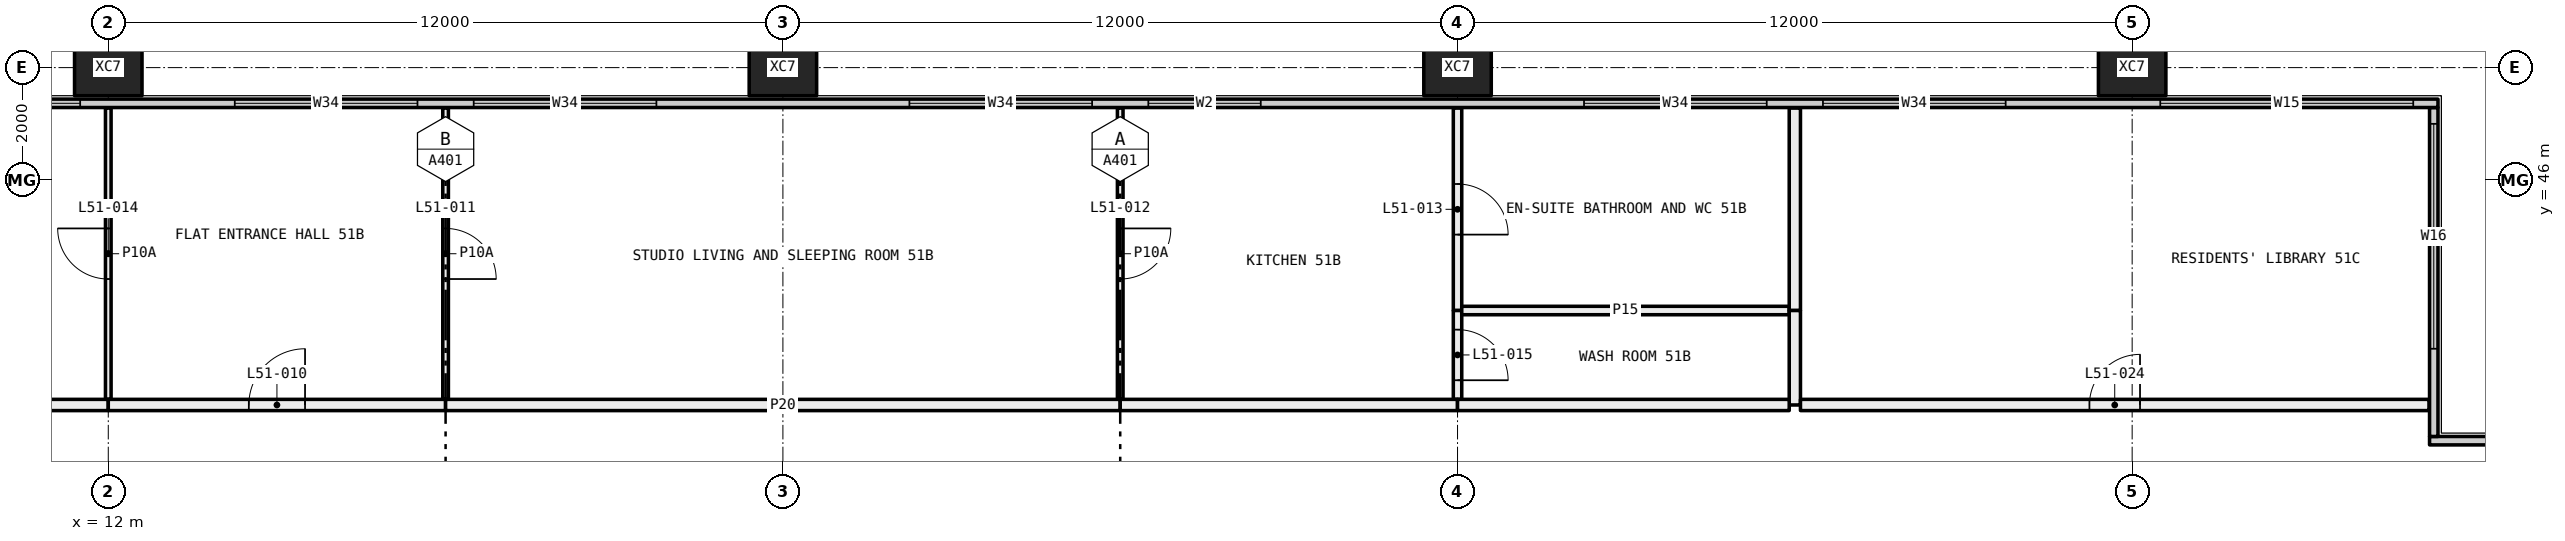
"""IFC4 building model, lengths in metres.
Left out: names, types, materials, properties, quantities, classifications, styles, units other than length and angle.
Written with IfcOpenShell. Run it as: python <this file> out.ifc"""

import sys

from ifc_helpers import new_model, si_unit, direction, frame, frame_2d, origin, origin_2d, place, context, subcontext, project, spatial, rectangle, hollow_rectangle, extrude, element, fill, save


model = new_model("IFC4")
c1 = context("Model", 3, precision=1e-05, world=origin(), true_north=direction((0.0, 1.0)))
c2 = subcontext(c1, "Body", "Model", "MODEL_VIEW")
j1 = project(units=[si_unit("LENGTHUNIT", "METRE"), si_unit("PLANEANGLEUNIT", "RADIAN")], contexts=[c1])
p1 = place(None, origin())
s1 = spatial("IfcSite", under=j1, at=p1, CompositionType="ELEMENT")
p2 = place(p1, origin())
s2 = spatial("IfcBuilding", under=s1, at=p2, CompositionType="ELEMENT")
p3 = place(p2, frame((0.0, 0.0, 192.75)))
s3 = spatial("IfcBuildingStorey", under=s2, at=p3, CompositionType="ELEMENT", Elevation=192.75)
for number, where, z_axis, x_axis in (
    (1, (12.0, 48.0, -0.4), (0.0, 0.0, 1.0), (1.0, 0.0, 0.0)),
    (2, (24.0, 48.0, -0.4), (0.0, 0.0, 1.0), (1.0, 0.0, 0.0)),
    (3, (36.0, 48.0, -0.4), (0.0, 0.0, 1.0), (1.0, 0.0, 0.0)),
    (4, (48.0, 48.0, -0.4), (0.0, 0.0, 1.0), (1.0, 0.0, 0.0)),
):
    element("IfcColumn", number, at=place(p3, frame(where, z_axis=z_axis, x_axis=x_axis)), inside=s3, PredefinedType="COLUMN", context=c2, shape_type="SweptSolid", body=[
        extrude(hollow_rectangle(XDim=1.2, YDim=1.0, WallThickness=0.045, at=origin_2d()), origin(), (0.0, 0.0, 1.0), 3.45),
    ])
p4 = place(p3, frame((53.29, 41.365, 0.0), z_axis=(0.0, 0.0, 1.0), x_axis=(1.0, 0.0, 0.0)))
e5 = element("IfcWall", 5, at=p4, inside=s3, PredefinedType="ELEMENTEDWALL", context=c2, shape_type="SweptSolid", body=[
    extrude(rectangle(XDim=6.15, YDim=0.15, at=frame_2d((3.075, 0.0))), origin(), (0.0, 0.0, 1.0), 3.05),
])
p5 = place(p4, frame((1.71, 0.0, 0.45)))
e6 = element("IfcOpeningElement", 6, at=p5, cuts=e5, PredefinedType="OPENING", context=c2, shape_type="SweptSolid", body=[
    extrude(rectangle(XDim=4.0, YDim=2.55, at=frame_2d((2.0, 1.275))), frame((0.0, 0.085, 0.0), z_axis=(0.0, -1.0, 0.0), x_axis=(1.0, 0.0, 0.0)), (0.0, 0.0, 1.0), 0.17),
])
p6 = place(p3, frame((53.365, 41.44, 0.0), z_axis=(0.0, 0.0, 1.0), x_axis=(0.0, 1.0, 0.0)))
e7 = element("IfcWall", 7, at=p6, inside=s3, PredefinedType="ELEMENTEDWALL", context=c2, shape_type="SweptSolid", body=[
    extrude(rectangle(XDim=5.85, YDim=0.15, at=frame_2d((2.925, 0.0))), origin(), (0.0, 0.0, 1.0), 3.05),
])
p7 = place(p6, frame((1.56, 0.0, 0.45)))
e8 = element("IfcOpeningElement", 8, at=p7, cuts=e7, PredefinedType="OPENING", context=c2, shape_type="SweptSolid", body=[
    extrude(rectangle(XDim=4.0, YDim=2.55, at=frame_2d((2.0, 1.275))), frame((0.0, 0.085, 0.0), z_axis=(0.0, -1.0, 0.0), x_axis=(1.0, 0.0, 0.0)), (0.0, 0.0, 1.0), 0.17),
])
p8 = place(p3, frame((6.56, 47.365, 0.0), z_axis=(0.0, 0.0, 1.0), x_axis=(1.0, 0.0, 0.0)))
e9 = element("IfcWall", 9, at=p8, inside=s3, PredefinedType="ELEMENTEDWALL", context=c2, shape_type="SweptSolid", body=[
    extrude(rectangle(XDim=46.88, YDim=0.15, at=frame_2d((23.44, 0.0))), origin(), (0.0, 0.0, 1.0), 3.05),
])
p9 = place(p8, frame((0.44, 0.0, 0.45)))
e10 = element("IfcOpeningElement", 10, at=p9, cuts=e9, PredefinedType="OPENING", context=c2, shape_type="SweptSolid", body=[
    extrude(rectangle(XDim=4.5, YDim=2.55, at=frame_2d((2.25, 1.275))), frame((0.0, 0.085, 0.0), z_axis=(0.0, -1.0, 0.0), x_axis=(1.0, 0.0, 0.0)), (0.0, 0.0, 1.0), 0.17),
])
p10 = place(p8, frame((7.69, 0.0, 0.45)))
e11 = element("IfcOpeningElement", 11, at=p10, cuts=e9, PredefinedType="OPENING", context=c2, shape_type="SweptSolid", body=[
    extrude(rectangle(XDim=3.25, YDim=2.55, at=frame_2d((1.625, 1.275))), frame((0.0, 0.085, 0.0), z_axis=(0.0, -1.0, 0.0), x_axis=(1.0, 0.0, 0.0)), (0.0, 0.0, 1.0), 0.17),
])
p11 = place(p8, frame((11.94, 0.0, 0.45)))
e12 = element("IfcOpeningElement", 12, at=p11, cuts=e9, PredefinedType="OPENING", context=c2, shape_type="SweptSolid", body=[
    extrude(rectangle(XDim=3.25, YDim=2.55, at=frame_2d((1.625, 1.275))), frame((0.0, 0.085, 0.0), z_axis=(0.0, -1.0, 0.0), x_axis=(1.0, 0.0, 0.0)), (0.0, 0.0, 1.0), 0.17),
])
p12 = place(p8, frame((19.69, 0.0, 0.45)))
e13 = element("IfcOpeningElement", 13, at=p12, cuts=e9, PredefinedType="OPENING", context=c2, shape_type="SweptSolid", body=[
    extrude(rectangle(XDim=3.25, YDim=2.55, at=frame_2d((1.625, 1.275))), frame((0.0, 0.085, 0.0), z_axis=(0.0, -1.0, 0.0), x_axis=(1.0, 0.0, 0.0)), (0.0, 0.0, 1.0), 0.17),
])
p13 = place(p8, frame((23.94, 0.0, 0.45)))
e14 = element("IfcOpeningElement", 14, at=p13, cuts=e9, PredefinedType="OPENING", context=c2, shape_type="SweptSolid", body=[
    extrude(rectangle(XDim=2.0, YDim=2.55, at=frame_2d((1.0, 1.275))), frame((0.0, 0.085, 0.0), z_axis=(0.0, -1.0, 0.0), x_axis=(1.0, 0.0, 0.0)), (0.0, 0.0, 1.0), 0.17),
])
p14 = place(p8, frame((31.69, 0.0, 0.45)))
e15 = element("IfcOpeningElement", 15, at=p14, cuts=e9, PredefinedType="OPENING", context=c2, shape_type="SweptSolid", body=[
    extrude(rectangle(XDim=3.25, YDim=2.55, at=frame_2d((1.625, 1.275))), frame((0.0, 0.085, 0.0), z_axis=(0.0, -1.0, 0.0), x_axis=(1.0, 0.0, 0.0)), (0.0, 0.0, 1.0), 0.17),
])
p15 = place(p8, frame((35.94, 0.0, 0.45)))
e16 = element("IfcOpeningElement", 16, at=p15, cuts=e9, PredefinedType="OPENING", context=c2, shape_type="SweptSolid", body=[
    extrude(rectangle(XDim=3.25, YDim=2.55, at=frame_2d((1.625, 1.275))), frame((0.0, 0.085, 0.0), z_axis=(0.0, -1.0, 0.0), x_axis=(1.0, 0.0, 0.0)), (0.0, 0.0, 1.0), 0.17),
])
p16 = place(p8, frame((41.94, 0.0, 0.45)))
e17 = element("IfcOpeningElement", 17, at=p16, cuts=e9, PredefinedType="OPENING", context=c2, shape_type="SweptSolid", body=[
    extrude(rectangle(XDim=4.5, YDim=2.55, at=frame_2d((2.25, 1.275))), frame((0.0, 0.085, 0.0), z_axis=(0.0, -1.0, 0.0), x_axis=(1.0, 0.0, 0.0)), (0.0, 0.0, 1.0), 0.17),
])
p17 = place(p3, frame((12.0, 42.1, 0.0), z_axis=(0.0, 0.0, 1.0), x_axis=(0.0, 1.0, 0.0)))
e18 = element("IfcWall", 18, at=p17, inside=s3, PredefinedType="PARTITIONING", context=c2, shape_type="SweptSolid", body=[
    extrude(rectangle(XDim=5.18, YDim=0.1, at=frame_2d((2.59, 0.0))), origin(), (0.0, 0.0, 1.0), 3.05),
])
p18 = place(p17, frame((2.14, 0.0, 0.0)))
e19 = element("IfcOpeningElement", 19, at=p18, cuts=e18, PredefinedType="OPENING", context=c2, shape_type="SweptSolid", body=[
    extrude(rectangle(XDim=0.9, YDim=2.1, at=frame_2d((0.45, 1.05))), frame((0.0, 0.06, 0.0), z_axis=(0.0, -1.0, 0.0), x_axis=(1.0, 0.0, 0.0)), (0.0, 0.0, 1.0), 0.12),
])
p19 = place(p3, frame((10.1, 42.0, 0.0), z_axis=(0.0, 0.0, 1.0), x_axis=(1.0, 0.0, 0.0)))
e20 = element("IfcWall", 20, at=p19, inside=s3, PredefinedType="PARTITIONING", context=c2, shape_type="SweptSolid", body=[
    extrude(rectangle(XDim=1.9, YDim=0.2, at=frame_2d((0.95, 0.0))), origin(), (0.0, 0.0, 1.0), 3.05),
])
p20 = place(p3, frame((18.0, 42.1, 0.0), z_axis=(0.0, 0.0, 1.0), x_axis=(0.0, 1.0, 0.0)))
e21 = element("IfcWall", 21, at=p20, inside=s3, PredefinedType="PARTITIONING", context=c2, shape_type="SweptSolid", body=[
    extrude(rectangle(XDim=5.18, YDim=0.1, at=frame_2d((2.59, 0.0))), origin(), (0.0, 0.0, 1.0), 3.05),
])
p21 = place(p20, frame((2.14, 0.0, 0.0)))
e22 = element("IfcOpeningElement", 22, at=p21, cuts=e21, PredefinedType="OPENING", context=c2, shape_type="SweptSolid", body=[
    extrude(rectangle(XDim=0.9, YDim=2.1, at=frame_2d((0.45, 1.05))), frame((0.0, 0.06, 0.0), z_axis=(0.0, -1.0, 0.0), x_axis=(1.0, 0.0, 0.0)), (0.0, 0.0, 1.0), 0.12),
])
p22 = place(p3, frame((12.0, 42.0, 0.0), z_axis=(0.0, 0.0, 1.0), x_axis=(1.0, 0.0, 0.0)))
e23 = element("IfcWall", 23, at=p22, inside=s3, PredefinedType="PARTITIONING", context=c2, shape_type="SweptSolid", body=[
    extrude(rectangle(XDim=6.0, YDim=0.2, at=frame_2d((3.0, 0.0))), origin(), (0.0, 0.0, 1.0), 3.05),
])
p23 = place(p22, frame((2.5, 0.0, 0.0)))
e24 = element("IfcOpeningElement", 24, at=p23, cuts=e23, PredefinedType="OPENING", context=c2, shape_type="SweptSolid", body=[
    extrude(rectangle(XDim=1.0, YDim=2.1, at=frame_2d((0.5, 1.05))), frame((0.0, 0.11, 0.0), z_axis=(0.0, -1.0, 0.0), x_axis=(1.0, 0.0, 0.0)), (0.0, 0.0, 1.0), 0.22),
])
p24 = place(p3, frame((30.0, 42.1, 0.0), z_axis=(0.0, 0.0, 1.0), x_axis=(0.0, 1.0, 0.0)))
e25 = element("IfcWall", 25, at=p24, inside=s3, PredefinedType="PARTITIONING", context=c2, shape_type="SweptSolid", body=[
    extrude(rectangle(XDim=5.18, YDim=0.1, at=frame_2d((2.59, 0.0))), origin(), (0.0, 0.0, 1.0), 3.05),
])
p25 = place(p24, frame((2.14, 0.0, 0.0)))
e26 = element("IfcOpeningElement", 26, at=p25, cuts=e25, PredefinedType="OPENING", context=c2, shape_type="SweptSolid", body=[
    extrude(rectangle(XDim=0.9, YDim=2.1, at=frame_2d((0.45, 1.05))), frame((0.0, 0.06, 0.0), z_axis=(0.0, -1.0, 0.0), x_axis=(1.0, 0.0, 0.0)), (0.0, 0.0, 1.0), 0.12),
])
p26 = place(p3, frame((18.0, 42.0, 0.0), z_axis=(0.0, 0.0, 1.0), x_axis=(1.0, 0.0, 0.0)))
e27 = element("IfcWall", 27, at=p26, inside=s3, PredefinedType="PARTITIONING", context=c2, shape_type="SweptSolid", body=[
    extrude(rectangle(XDim=12.0, YDim=0.2, at=frame_2d((6.0, 0.0))), origin(), (0.0, 0.0, 1.0), 3.05),
])
p27 = place(p3, frame((36.0, 43.68, 0.0), z_axis=(0.0, 0.0, 1.0), x_axis=(0.0, 1.0, 0.0)))
e28 = element("IfcWall", 28, at=p27, inside=s3, PredefinedType="PARTITIONING", context=c2, shape_type="SweptSolid", body=[
    extrude(rectangle(XDim=3.6, YDim=0.15, at=frame_2d((1.8, 0.0))), origin(), (0.0, 0.0, 1.0), 2.45),
])
p28 = place(p27, frame((1.35, 0.0, 0.0)))
e29 = element("IfcOpeningElement", 29, at=p28, cuts=e28, PredefinedType="OPENING", context=c2, shape_type="SweptSolid", body=[
    extrude(rectangle(XDim=0.9, YDim=2.1, at=frame_2d((0.45, 1.05))), frame((0.0, 0.085, 0.0), z_axis=(0.0, -1.0, 0.0), x_axis=(1.0, 0.0, 0.0)), (0.0, 0.0, 1.0), 0.17),
])
p29 = place(p3, frame((36.0, 42.1, 0.0), z_axis=(0.0, 0.0, 1.0), x_axis=(0.0, 1.0, 0.0)))
e30 = element("IfcWall", 30, at=p29, inside=s3, PredefinedType="PARTITIONING", context=c2, shape_type="SweptSolid", body=[
    extrude(rectangle(XDim=1.58, YDim=0.15, at=frame_2d((0.79, 0.0))), origin(), (0.0, 0.0, 1.0), 2.45),
])
p30 = place(p29, frame((0.34, 0.0, 0.0)))
e31 = element("IfcOpeningElement", 31, at=p30, cuts=e30, PredefinedType="OPENING", context=c2, shape_type="SweptSolid", body=[
    extrude(rectangle(XDim=0.9, YDim=2.1, at=frame_2d((0.45, 1.05))), frame((0.0, 0.085, 0.0), z_axis=(0.0, -1.0, 0.0), x_axis=(1.0, 0.0, 0.0)), (0.0, 0.0, 1.0), 0.17),
])
p31 = place(p3, frame((30.0, 42.0, 0.0), z_axis=(0.0, 0.0, 1.0), x_axis=(1.0, 0.0, 0.0)))
e32 = element("IfcWall", 32, at=p31, inside=s3, PredefinedType="PARTITIONING", context=c2, shape_type="SweptSolid", body=[
    extrude(rectangle(XDim=6.0, YDim=0.2, at=frame_2d((3.0, 0.0))), origin(), (0.0, 0.0, 1.0), 2.45),
])
p32 = place(p3, frame((36.075, 43.68, 0.0), z_axis=(0.0, 0.0, 1.0), x_axis=(1.0, 0.0, 0.0)))
e33 = element("IfcWall", 33, at=p32, inside=s3, PredefinedType="PARTITIONING", context=c2, shape_type="SweptSolid", body=[
    extrude(rectangle(XDim=5.825, YDim=0.15, at=frame_2d((2.913, 0.0))), origin(), (0.0, 0.0, 1.0), 2.45),
])
p33 = place(p3, frame((42.0, 43.68, 0.0), z_axis=(0.0, 0.0, 1.0), x_axis=(0.0, 1.0, 0.0)))
e34 = element("IfcWall", 34, at=p33, inside=s3, PredefinedType="PARTITIONING", context=c2, shape_type="SweptSolid", body=[
    extrude(rectangle(XDim=3.6, YDim=0.2, at=frame_2d((1.8, 0.0))), origin(), (0.0, 0.0, 1.0), 3.05),
])
p34 = place(p3, frame((42.0, 42.0, 0.0), z_axis=(0.0, 0.0, 1.0), x_axis=(0.0, 1.0, 0.0)))
e35 = element("IfcWall", 35, at=p34, inside=s3, PredefinedType="PARTITIONING", context=c2, shape_type="SweptSolid", body=[
    extrude(rectangle(XDim=1.68, YDim=0.2, at=frame_2d((0.84, 0.0))), origin(), (0.0, 0.0, 1.0), 3.05),
])
p35 = place(p3, frame((36.0, 42.0, 0.0), z_axis=(0.0, 0.0, 1.0), x_axis=(1.0, 0.0, 0.0)))
e36 = element("IfcWall", 36, at=p35, inside=s3, PredefinedType="PARTITIONING", context=c2, shape_type="SweptSolid", body=[
    extrude(rectangle(XDim=5.9, YDim=0.2, at=frame_2d((2.95, 0.0))), origin(), (0.0, 0.0, 1.0), 2.45),
])
p36 = place(p3, frame((42.1, 42.0, 0.0), z_axis=(0.0, 0.0, 1.0), x_axis=(1.0, 0.0, 0.0)))
e37 = element("IfcWall", 37, at=p36, inside=s3, PredefinedType="PARTITIONING", context=c2, shape_type="SweptSolid", body=[
    extrude(rectangle(XDim=11.18, YDim=0.2, at=frame_2d((5.59, 0.0))), origin(), (0.0, 0.0, 1.0), 3.05),
])
p37 = place(p36, frame((5.14, 0.0, 0.0)))
e38 = element("IfcOpeningElement", 38, at=p37, cuts=e37, PredefinedType="OPENING", context=c2, shape_type="SweptSolid", body=[
    extrude(rectangle(XDim=0.9, YDim=2.1, at=frame_2d((0.45, 1.05))), frame((0.0, 0.11, 0.0), z_axis=(0.0, -1.0, 0.0), x_axis=(1.0, 0.0, 0.0)), (0.0, 0.0, 1.0), 0.22),
])
p38 = place(p7, origin())
e39 = element("IfcWindow", 39, at=p38, inside=s3, PartitioningType="SINGLE_PANEL", PredefinedType="WINDOW", context=c2, shape_type="SweptSolid", body=[
    extrude(rectangle(XDim=4.0, YDim=2.55, at=frame_2d((2.0, 1.275))), frame((0.0, 0.03, 0.0), z_axis=(0.0, -1.0, 0.0), x_axis=(1.0, 0.0, 0.0)), (0.0, 0.0, 1.0), 0.06),
])
fill(e8, e39)
p39 = place(p9, origin())
e40 = element("IfcWindow", 40, at=p39, inside=s3, PartitioningType="SINGLE_PANEL", PredefinedType="WINDOW", context=c2, shape_type="SweptSolid", body=[
    extrude(rectangle(XDim=4.5, YDim=2.55, at=frame_2d((2.25, 1.275))), frame((0.0, 0.03, 0.0), z_axis=(0.0, -1.0, 0.0), x_axis=(1.0, 0.0, 0.0)), (0.0, 0.0, 1.0), 0.06),
])
fill(e10, e40)
p40 = place(p10, origin())
e41 = element("IfcWindow", 41, at=p40, inside=s3, PartitioningType="SINGLE_PANEL", PredefinedType="WINDOW", context=c2, shape_type="SweptSolid", body=[
    extrude(rectangle(XDim=3.25, YDim=2.55, at=frame_2d((1.625, 1.275))), frame((0.0, 0.03, 0.0), z_axis=(0.0, -1.0, 0.0), x_axis=(1.0, 0.0, 0.0)), (0.0, 0.0, 1.0), 0.06),
])
fill(e11, e41)
p41 = place(p11, origin())
e42 = element("IfcWindow", 42, at=p41, inside=s3, PartitioningType="SINGLE_PANEL", PredefinedType="WINDOW", context=c2, shape_type="SweptSolid", body=[
    extrude(rectangle(XDim=3.25, YDim=2.55, at=frame_2d((1.625, 1.275))), frame((0.0, 0.03, 0.0), z_axis=(0.0, -1.0, 0.0), x_axis=(1.0, 0.0, 0.0)), (0.0, 0.0, 1.0), 0.06),
])
fill(e12, e42)
p42 = place(p12, origin())
e43 = element("IfcWindow", 43, at=p42, inside=s3, PartitioningType="SINGLE_PANEL", PredefinedType="WINDOW", context=c2, shape_type="SweptSolid", body=[
    extrude(rectangle(XDim=3.25, YDim=2.55, at=frame_2d((1.625, 1.275))), frame((0.0, 0.03, 0.0), z_axis=(0.0, -1.0, 0.0), x_axis=(1.0, 0.0, 0.0)), (0.0, 0.0, 1.0), 0.06),
])
fill(e13, e43)
p43 = place(p13, origin())
e44 = element("IfcWindow", 44, at=p43, inside=s3, PartitioningType="SINGLE_PANEL", PredefinedType="WINDOW", context=c2, shape_type="SweptSolid", body=[
    extrude(rectangle(XDim=2.0, YDim=2.55, at=frame_2d((1.0, 1.275))), frame((0.0, 0.03, 0.0), z_axis=(0.0, -1.0, 0.0), x_axis=(1.0, 0.0, 0.0)), (0.0, 0.0, 1.0), 0.06),
])
fill(e14, e44)
p44 = place(p14, origin())
e45 = element("IfcWindow", 45, at=p44, inside=s3, PartitioningType="SINGLE_PANEL", PredefinedType="WINDOW", context=c2, shape_type="SweptSolid", body=[
    extrude(rectangle(XDim=3.25, YDim=2.55, at=frame_2d((1.625, 1.275))), frame((0.0, 0.03, 0.0), z_axis=(0.0, -1.0, 0.0), x_axis=(1.0, 0.0, 0.0)), (0.0, 0.0, 1.0), 0.06),
])
fill(e15, e45)
p45 = place(p15, origin())
e46 = element("IfcWindow", 46, at=p45, inside=s3, PartitioningType="SINGLE_PANEL", PredefinedType="WINDOW", context=c2, shape_type="SweptSolid", body=[
    extrude(rectangle(XDim=3.25, YDim=2.55, at=frame_2d((1.625, 1.275))), frame((0.0, 0.03, 0.0), z_axis=(0.0, -1.0, 0.0), x_axis=(1.0, 0.0, 0.0)), (0.0, 0.0, 1.0), 0.06),
])
fill(e16, e46)
p46 = place(p16, origin())
e47 = element("IfcWindow", 47, at=p46, inside=s3, PartitioningType="SINGLE_PANEL", PredefinedType="WINDOW", context=c2, shape_type="SweptSolid", body=[
    extrude(rectangle(XDim=4.5, YDim=2.55, at=frame_2d((2.25, 1.275))), frame((0.0, 0.03, 0.0), z_axis=(0.0, -1.0, 0.0), x_axis=(1.0, 0.0, 0.0)), (0.0, 0.0, 1.0), 0.06),
])
fill(e17, e47)
p47 = place(p23, origin())
e48 = element("IfcDoor", 48, at=p47, inside=s3, OperationType="SINGLE_SWING_LEFT", PredefinedType="DOOR", context=c2, shape_type="SweptSolid", body=[
    extrude(rectangle(XDim=1.0, YDim=2.1, at=frame_2d((0.5, 1.05))), frame((0.0, 0.025, 0.0), z_axis=(0.0, -1.0, 0.0), x_axis=(1.0, 0.0, 0.0)), (0.0, 0.0, 1.0), 0.05),
])
fill(e24, e48)
p48 = place(p21, frame((0.9, 0.0, 0.0), x_axis=(-1.0, 0.0, 0.0)))
e49 = element("IfcDoor", 49, at=p48, inside=s3, OperationType="SINGLE_SWING_LEFT", PredefinedType="DOOR", context=c2, shape_type="SweptSolid", body=[
    extrude(rectangle(XDim=0.9, YDim=2.1, at=frame_2d((0.45, 1.05))), frame((0.0, 0.025, 0.0), z_axis=(0.0, -1.0, 0.0), x_axis=(1.0, 0.0, 0.0)), (0.0, 0.0, 1.0), 0.05),
])
fill(e22, e49)
p49 = place(p25, frame((0.9, 0.0, 0.0), x_axis=(-1.0, 0.0, 0.0)))
e50 = element("IfcDoor", 50, at=p49, inside=s3, OperationType="SINGLE_SWING_RIGHT", PredefinedType="DOOR", context=c2, shape_type="SweptSolid", body=[
    extrude(rectangle(XDim=0.9, YDim=2.1, at=frame_2d((0.45, 1.05))), frame((0.0, 0.025, 0.0), z_axis=(0.0, -1.0, 0.0), x_axis=(1.0, 0.0, 0.0)), (0.0, 0.0, 1.0), 0.05),
])
fill(e26, e50)
p50 = place(p28, frame((0.9, 0.0, 0.0), x_axis=(-1.0, 0.0, 0.0)))
e51 = element("IfcDoor", 51, at=p50, inside=s3, OperationType="SINGLE_SWING_LEFT", PredefinedType="DOOR", context=c2, shape_type="SweptSolid", body=[
    extrude(rectangle(XDim=0.9, YDim=2.1, at=frame_2d((0.45, 1.05))), frame((0.0, 0.025, 0.0), z_axis=(0.0, -1.0, 0.0), x_axis=(1.0, 0.0, 0.0)), (0.0, 0.0, 1.0), 0.05),
])
fill(e29, e51)
p51 = place(p18, origin())
e52 = element("IfcDoor", 52, at=p51, inside=s3, OperationType="SINGLE_SWING_LEFT", PredefinedType="DOOR", context=c2, shape_type="SweptSolid", body=[
    extrude(rectangle(XDim=0.9, YDim=2.1, at=frame_2d((0.45, 1.05))), frame((0.0, 0.025, 0.0), z_axis=(0.0, -1.0, 0.0), x_axis=(1.0, 0.0, 0.0)), (0.0, 0.0, 1.0), 0.05),
])
fill(e19, e52)
p52 = place(p30, frame((0.9, 0.0, 0.0), x_axis=(-1.0, 0.0, 0.0)))
e53 = element("IfcDoor", 53, at=p52, inside=s3, OperationType="SINGLE_SWING_LEFT", PredefinedType="DOOR", context=c2, shape_type="SweptSolid", body=[
    extrude(rectangle(XDim=0.9, YDim=2.1, at=frame_2d((0.45, 1.05))), frame((0.0, 0.025, 0.0), z_axis=(0.0, -1.0, 0.0), x_axis=(1.0, 0.0, 0.0)), (0.0, 0.0, 1.0), 0.05),
])
fill(e31, e53)
p53 = place(p37, origin())
e54 = element("IfcDoor", 54, at=p53, inside=s3, OperationType="SINGLE_SWING_LEFT", PredefinedType="DOOR", context=c2, shape_type="SweptSolid", body=[
    extrude(rectangle(XDim=0.9, YDim=2.1, at=frame_2d((0.45, 1.05))), frame((0.0, 0.025, 0.0), z_axis=(0.0, -1.0, 0.0), x_axis=(1.0, 0.0, 0.0)), (0.0, 0.0, 1.0), 0.05),
])
fill(e38, e54)
save(model, sys.argv[1])
